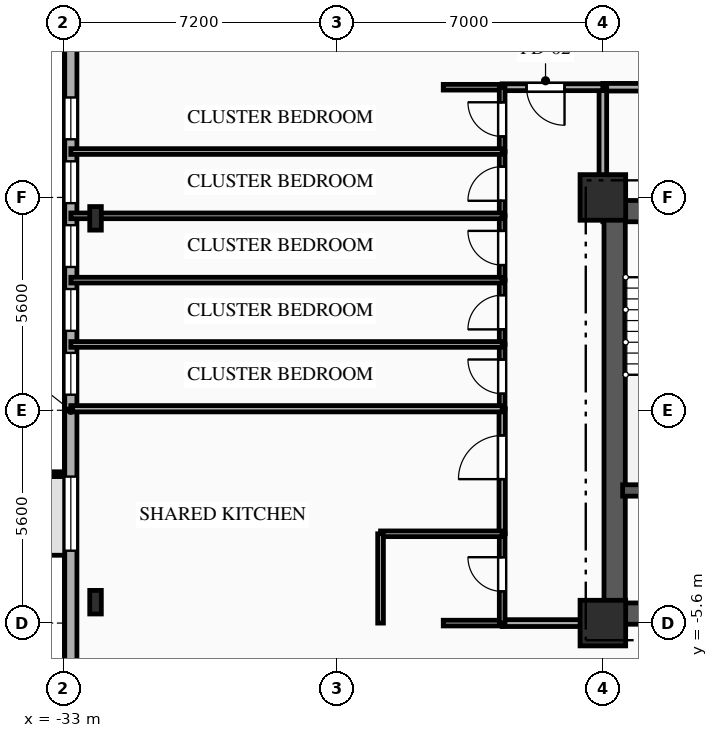
"""IFC4 building model, lengths in metres.
Left out: names, types, materials, properties, quantities, classifications, styles, units other than length and angle.
Written with IfcOpenShell. Run it as: python <this file> out.ifc"""

import sys

from ifc_helpers import new_model, si_unit, direction, frame, frame_2d, origin, origin_2d, place, context, subcontext, project, spatial, rectangle, i_section, extrude, element, fill, save


model = new_model("IFC4")
c1 = context("Model", 3, precision=1e-05, world=origin(), true_north=direction((0.0, 1.0)))
c2 = subcontext(c1, "Body", "Model", "MODEL_VIEW")
j1 = project(units=[si_unit("LENGTHUNIT", "METRE"), si_unit("PLANEANGLEUNIT", "RADIAN")], contexts=[c1])
p1 = place(None, origin())
s1 = spatial("IfcSite", under=j1, at=p1, CompositionType="ELEMENT")
p2 = place(p1, origin())
s2 = spatial("IfcBuilding", under=s1, at=p2, CompositionType="ELEMENT")
p3 = place(p2, frame((0.0, 0.0, 60.5)))
s3 = spatial("IfcBuildingStorey", under=s2, at=p3, CompositionType="ELEMENT", Elevation=60.5)
for number, where, z_axis, x_axis in (
    (1, (-18.8, -5.6, 0.0), (0.0, 0.0, 1.0), (1.0, 0.0, 0.0)),
    (2, (-18.8, 5.6, 0.0), (0.0, 0.0, 1.0), (1.0, 0.0, 0.0)),
):
    element("IfcColumn", number, at=place(p3, frame(where, z_axis=z_axis, x_axis=x_axis)), inside=s3, PredefinedType="COLUMN", context=c2, shape_type="SweptSolid", body=[
        extrude(rectangle(XDim=1.2, YDim=1.2, at=origin_2d()), origin(), (0.0, 0.0, 1.0), 3.35),
    ])
for number, where, z_axis, x_axis in (
    (3, (-32.15, 5.05, 0.0), (0.0, 0.0, 1.0), (1.0, 0.0, 0.0)),
    (4, (-32.15, -5.05, 0.0), (0.0, 0.0, 1.0), (1.0, 0.0, 0.0)),
):
    element("IfcColumn", number, at=place(p3, frame(where, z_axis=z_axis, x_axis=x_axis)), inside=s3, PredefinedType="COLUMN", context=c2, shape_type="SweptSolid", body=[
        extrude(i_section(OverallWidth=0.305, OverallDepth=0.62, WebThickness=0.021, FlangeThickness=0.04, FilletRadius=0.027, at=origin_2d()), origin(), (0.0, 0.0, 1.0), 3.35),
    ])
p4 = place(p3, frame((-32.8, -15.8, 0.0), z_axis=(0.0, 0.0, 1.0), x_axis=(0.0, 1.0, 0.0)))
e5 = element("IfcWall", 5, at=p4, inside=s3, PredefinedType="SOLIDWALL", context=c2, shape_type="SweptSolid", body=[
    extrude(rectangle(XDim=31.6, YDim=0.32, at=frame_2d((15.8, 0.0))), origin(), (0.0, 0.0, 1.0), 3.035),
])
p5 = place(p4, frame((12.105, 0.0, 0.85)))
e6 = element("IfcOpeningElement", 6, at=p5, cuts=e5, PredefinedType="OPENING", context=c2, shape_type="SweptSolid", body=[
    extrude(rectangle(XDim=1.95, YDim=1.85, at=frame_2d((0.975, 0.925))), frame((0.0, 0.17, 0.0), z_axis=(0.0, -1.0, 0.0), x_axis=(1.0, 0.0, 0.0)), (0.0, 0.0, 1.0), 0.34),
])
p6 = place(p4, frame((16.21, 0.0, 0.85)))
e7 = element("IfcOpeningElement", 7, at=p6, cuts=e5, PredefinedType="OPENING", context=c2, shape_type="SweptSolid", body=[
    extrude(rectangle(XDim=1.1, YDim=1.85, at=frame_2d((0.55, 0.925))), frame((0.0, 0.17, 0.0), z_axis=(0.0, -1.0, 0.0), x_axis=(1.0, 0.0, 0.0)), (0.0, 0.0, 1.0), 0.34),
])
p7 = place(p4, frame((17.89, 0.0, 0.85)))
e8 = element("IfcOpeningElement", 8, at=p7, cuts=e5, PredefinedType="OPENING", context=c2, shape_type="SweptSolid", body=[
    extrude(rectangle(XDim=1.1, YDim=1.85, at=frame_2d((0.55, 0.925))), frame((0.0, 0.17, 0.0), z_axis=(0.0, -1.0, 0.0), x_axis=(1.0, 0.0, 0.0)), (0.0, 0.0, 1.0), 0.34),
])
p8 = place(p4, frame((19.57, 0.0, 0.85)))
e9 = element("IfcOpeningElement", 9, at=p8, cuts=e5, PredefinedType="OPENING", context=c2, shape_type="SweptSolid", body=[
    extrude(rectangle(XDim=1.1, YDim=1.85, at=frame_2d((0.55, 0.925))), frame((0.0, 0.17, 0.0), z_axis=(0.0, -1.0, 0.0), x_axis=(1.0, 0.0, 0.0)), (0.0, 0.0, 1.0), 0.34),
])
p9 = place(p4, frame((21.25, 0.0, 0.85)))
e10 = element("IfcOpeningElement", 10, at=p9, cuts=e5, PredefinedType="OPENING", context=c2, shape_type="SweptSolid", body=[
    extrude(rectangle(XDim=1.1, YDim=1.85, at=frame_2d((0.55, 0.925))), frame((0.0, 0.17, 0.0), z_axis=(0.0, -1.0, 0.0), x_axis=(1.0, 0.0, 0.0)), (0.0, 0.0, 1.0), 0.34),
])
p10 = place(p4, frame((22.93, 0.0, 0.85)))
e11 = element("IfcOpeningElement", 11, at=p10, cuts=e5, PredefinedType="OPENING", context=c2, shape_type="SweptSolid", body=[
    extrude(rectangle(XDim=1.1, YDim=1.85, at=frame_2d((0.55, 0.925))), frame((0.0, 0.17, 0.0), z_axis=(0.0, -1.0, 0.0), x_axis=(1.0, 0.0, 0.0)), (0.0, 0.0, 1.0), 0.34),
])
p11 = place(p3, frame((-18.8, 5.24, 0.0), z_axis=(0.0, 0.0, 1.0), x_axis=(1.0, 0.0, 0.0)))
e12 = element("IfcWall", 12, at=p11, inside=s3, PredefinedType="SHEAR", context=c2, shape_type="SweptSolid", body=[
    extrude(rectangle(XDim=9.6, YDim=0.56, at=frame_2d((4.8, 0.0))), origin(), (0.0, 0.0, 1.0), 3.035),
])
p12 = place(p11, frame((1.55, 0.0, 0.0)))
e13 = element("IfcOpeningElement", 13, at=p12, cuts=e12, PredefinedType="OPENING", context=c2, shape_type="SweptSolid", body=[
    extrude(rectangle(XDim=1.1, YDim=2.15, at=frame_2d((0.55, 1.075))), frame((0.0, 0.29, 0.0), z_axis=(0.0, -1.0, 0.0), x_axis=(1.0, 0.0, 0.0)), (0.0, 0.0, 1.0), 0.58),
])
p13 = place(p11, frame((4.775, 0.0, 0.0)))
e14 = element("IfcOpeningElement", 14, at=p13, cuts=e12, PredefinedType="OPENING", context=c2, shape_type="SweptSolid", body=[
    extrude(rectangle(XDim=1.05, YDim=2.1, at=frame_2d((0.525, 1.05))), frame((0.0, 0.29, 0.0), z_axis=(0.0, -1.0, 0.0), x_axis=(1.0, 0.0, 0.0)), (0.0, 0.0, 1.0), 0.58),
])
p14 = place(p3, frame((-18.8, -5.35, 0.0), z_axis=(0.0, 0.0, 1.0), x_axis=(1.0, 0.0, 0.0)))
e15 = element("IfcWall", 15, at=p14, inside=s3, PredefinedType="SHEAR", context=c2, shape_type="SweptSolid", body=[
    extrude(rectangle(XDim=9.6, YDim=0.56, at=frame_2d((4.8, 0.0))), origin(), (0.0, 0.0, 1.0), 3.035),
])
p15 = place(p14, frame((1.05, 0.0, 0.0)))
e16 = element("IfcOpeningElement", 16, at=p15, cuts=e15, PredefinedType="OPENING", context=c2, shape_type="SweptSolid", body=[
    extrude(rectangle(XDim=0.9, YDim=2.1, at=frame_2d((0.45, 1.05))), frame((0.0, 0.29, 0.0), z_axis=(0.0, -1.0, 0.0), x_axis=(1.0, 0.0, 0.0)), (0.0, 0.0, 1.0), 0.58),
])
p16 = place(p3, frame((-18.49, -5.05, 0.0), z_axis=(0.0, 0.0, 1.0), x_axis=(0.0, 1.0, 0.0)))
e17 = element("IfcWall", 17, at=p16, inside=s3, PredefinedType="SHEAR", context=c2, shape_type="SweptSolid", body=[
    extrude(rectangle(XDim=10.1, YDim=0.56, at=frame_2d((5.05, 0.0))), origin(), (0.0, 0.0, 1.0), 3.035),
])
p17 = place(p3, frame((-18.28, -2.11, 0.0), z_axis=(0.0, 0.0, 1.0), x_axis=(1.0, 0.0, 0.0)))
e18 = element("IfcWall", 18, at=p17, inside=s3, PredefinedType="SHEAR", context=c2, shape_type="SweptSolid", body=[
    extrude(rectangle(XDim=3.18, YDim=0.3, at=frame_2d((1.59, 0.0))), origin(), (0.0, 0.0, 1.0), 3.035),
])
p18 = place(p3, frame((-12.0, 8.5, 0.0), z_axis=(0.0, 0.0, 1.0), x_axis=(-1.0, 0.0, 0.0)))
e19 = element("IfcWall", 19, at=p18, inside=s3, PredefinedType="PARTITIONING", context=c2, shape_type="SweptSolid", body=[
    extrude(rectangle(XDim=6.8, YDim=0.2, at=frame_2d((3.4, 0.0))), origin(), (0.0, 0.0, 1.0), 3.035),
])
p19 = place(p18, frame((1.715, 0.0, 0.0)))
e20 = element("IfcOpeningElement", 20, at=p19, cuts=e19, PredefinedType="OPENING", context=c2, shape_type="SweptSolid", body=[
    extrude(rectangle(XDim=1.1, YDim=2.15, at=frame_2d((0.55, 1.075))), frame((0.0, 0.11, 0.0), z_axis=(0.0, -1.0, 0.0), x_axis=(1.0, 0.0, 0.0)), (0.0, 0.0, 1.0), 0.22),
])
p20 = place(p3, frame((-18.8, 8.5, 0.0), z_axis=(0.0, 0.0, 1.0), x_axis=(0.0, -1.0, 0.0)))
e21 = element("IfcWall", 21, at=p20, inside=s3, PredefinedType="PARTITIONING", context=c2, shape_type="SweptSolid", body=[
    extrude(rectangle(XDim=2.9, YDim=0.2, at=frame_2d((1.45, 0.0))), origin(), (0.0, 0.0, 1.0), 2.52),
])
p21 = place(p3, frame((-18.8, 8.5, 0.0), z_axis=(0.0, 0.0, 1.0), x_axis=(-1.0, 0.0, 0.0)))
e22 = element("IfcWall", 22, at=p21, inside=s3, PredefinedType="PARTITIONING", context=c2, shape_type="SweptSolid", body=[
    extrude(rectangle(XDim=2.65, YDim=0.18, at=frame_2d((1.325, 0.0))), origin(), (0.0, 0.0, 1.0), 3.035),
])
p22 = place(p21, frame((1.009, 0.0, 0.0)))
e23 = element("IfcOpeningElement", 23, at=p22, cuts=e22, PredefinedType="OPENING", context=c2, shape_type="SweptSolid", body=[
    extrude(rectangle(XDim=1.0, YDim=2.15, at=frame_2d((0.5, 1.075))), frame((0.0, 0.1, 0.0), z_axis=(0.0, -1.0, 0.0), x_axis=(1.0, 0.0, 0.0)), (0.0, 0.0, 1.0), 0.2),
])
p23 = place(p3, frame((-21.45, 8.5, 0.0), z_axis=(0.0, 0.0, 1.0), x_axis=(-1.0, 0.0, 0.0)))
e24 = element("IfcWall", 24, at=p23, inside=s3, PredefinedType="PARTITIONING", context=c2, shape_type="SweptSolid", body=[
    extrude(rectangle(XDim=1.55, YDim=0.15, at=frame_2d((0.775, 0.0))), origin(), (0.0, 0.0, 1.0), 3.035),
])
p24 = place(p3, frame((-21.45, -5.6, 0.0), z_axis=(0.0, 0.0, 1.0), x_axis=(1.0, 0.0, 0.0)))
e25 = element("IfcWall", 25, at=p24, inside=s3, PredefinedType="PARTITIONING", context=c2, shape_type="SweptSolid", body=[
    extrude(rectangle(XDim=2.65, YDim=0.18, at=frame_2d((1.325, 0.0))), origin(), (0.0, 0.0, 1.0), 3.035),
])
p25 = place(p3, frame((-23.0, -5.6, 0.0), z_axis=(0.0, 0.0, 1.0), x_axis=(1.0, 0.0, 0.0)))
e26 = element("IfcWall", 26, at=p25, inside=s3, PredefinedType="PLUMBINGWALL", context=c2, shape_type="SweptSolid", body=[
    extrude(rectangle(XDim=1.55, YDim=0.15, at=frame_2d((0.775, 0.0))), origin(), (0.0, 0.0, 1.0), 3.035),
])
p26 = place(p3, frame((-21.45, -5.6, 0.0), z_axis=(0.0, 0.0, 1.0), x_axis=(0.0, 1.0, 0.0)))
e27 = element("IfcWall", 27, at=p26, inside=s3, PredefinedType="PLUMBINGWALL", context=c2, shape_type="SweptSolid", body=[
    extrude(rectangle(XDim=2.35, YDim=0.15, at=frame_2d((1.175, 0.0))), origin(), (0.0, 0.0, 1.0), 3.035),
])
p27 = place(p26, frame((0.834, 0.0, 0.0)))
e28 = element("IfcOpeningElement", 28, at=p27, cuts=e27, PredefinedType="OPENING", context=c2, shape_type="SweptSolid", body=[
    extrude(rectangle(XDim=0.9, YDim=2.1, at=frame_2d((0.45, 1.05))), frame((0.0, 0.085, 0.0), z_axis=(0.0, -1.0, 0.0), x_axis=(1.0, 0.0, 0.0)), (0.0, 0.0, 1.0), 0.17),
])
p28 = place(p3, frame((-21.45, -3.25, 0.0), z_axis=(0.0, 0.0, 1.0), x_axis=(0.0, 1.0, 0.0)))
e29 = element("IfcWall", 29, at=p28, inside=s3, PredefinedType="PARTITIONING", context=c2, shape_type="SweptSolid", body=[
    extrude(rectangle(XDim=3.29, YDim=0.165, at=frame_2d((1.645, 0.0))), origin(), (0.0, 0.0, 1.0), 3.035),
])
p29 = place(p28, frame((1.438, 0.0, 0.0)))
e30 = element("IfcOpeningElement", 30, at=p29, cuts=e29, PredefinedType="OPENING", context=c2, shape_type="SweptSolid", body=[
    extrude(rectangle(XDim=1.15, YDim=2.15, at=frame_2d((0.575, 1.075))), frame((0.0, 0.093, 0.0), z_axis=(0.0, -1.0, 0.0), x_axis=(1.0, 0.0, 0.0)), (0.0, 0.0, 1.0), 0.185),
])
p30 = place(p3, frame((-21.45, 0.04, 0.0), z_axis=(0.0, 0.0, 1.0), x_axis=(0.0, 1.0, 0.0)))
e31 = element("IfcWall", 31, at=p30, inside=s3, PredefinedType="PARTITIONING", context=c2, shape_type="SweptSolid", body=[
    extrude(rectangle(XDim=1.692, YDim=0.15, at=frame_2d((0.846, 0.0))), origin(), (0.0, 0.0, 1.0), 3.035),
])
p31 = place(p30, frame((0.396, 0.0, 0.0)))
e32 = element("IfcOpeningElement", 32, at=p31, cuts=e31, PredefinedType="OPENING", context=c2, shape_type="SweptSolid", body=[
    extrude(rectangle(XDim=0.9, YDim=2.1, at=frame_2d((0.45, 1.05))), frame((0.0, 0.085, 0.0), z_axis=(0.0, -1.0, 0.0), x_axis=(1.0, 0.0, 0.0)), (0.0, 0.0, 1.0), 0.17),
])
p32 = place(p3, frame((-21.45, 1.732, 0.0), z_axis=(0.0, 0.0, 1.0), x_axis=(0.0, 1.0, 0.0)))
e33 = element("IfcWall", 33, at=p32, inside=s3, PredefinedType="PARTITIONING", context=c2, shape_type="SweptSolid", body=[
    extrude(rectangle(XDim=1.692, YDim=0.15, at=frame_2d((0.846, 0.0))), origin(), (0.0, 0.0, 1.0), 3.035),
])
p33 = place(p32, frame((0.396, 0.0, 0.0)))
e34 = element("IfcOpeningElement", 34, at=p33, cuts=e33, PredefinedType="OPENING", context=c2, shape_type="SweptSolid", body=[
    extrude(rectangle(XDim=0.9, YDim=2.1, at=frame_2d((0.45, 1.05))), frame((0.0, 0.085, 0.0), z_axis=(0.0, -1.0, 0.0), x_axis=(1.0, 0.0, 0.0)), (0.0, 0.0, 1.0), 0.17),
])
p34 = place(p3, frame((-21.45, 3.424, 0.0), z_axis=(0.0, 0.0, 1.0), x_axis=(0.0, 1.0, 0.0)))
e35 = element("IfcWall", 35, at=p34, inside=s3, PredefinedType="PARTITIONING", context=c2, shape_type="SweptSolid", body=[
    extrude(rectangle(XDim=1.692, YDim=0.15, at=frame_2d((0.846, 0.0))), origin(), (0.0, 0.0, 1.0), 3.035),
])
p35 = place(p34, frame((0.396, 0.0, 0.0)))
e36 = element("IfcOpeningElement", 36, at=p35, cuts=e35, PredefinedType="OPENING", context=c2, shape_type="SweptSolid", body=[
    extrude(rectangle(XDim=0.9, YDim=2.1, at=frame_2d((0.45, 1.05))), frame((0.0, 0.085, 0.0), z_axis=(0.0, -1.0, 0.0), x_axis=(1.0, 0.0, 0.0)), (0.0, 0.0, 1.0), 0.17),
])
p36 = place(p3, frame((-21.45, 5.116, 0.0), z_axis=(0.0, 0.0, 1.0), x_axis=(0.0, 1.0, 0.0)))
e37 = element("IfcWall", 37, at=p36, inside=s3, PredefinedType="PARTITIONING", context=c2, shape_type="SweptSolid", body=[
    extrude(rectangle(XDim=1.692, YDim=0.15, at=frame_2d((0.846, 0.0))), origin(), (0.0, 0.0, 1.0), 3.035),
])
p37 = place(p36, frame((0.396, 0.0, 0.0)))
e38 = element("IfcOpeningElement", 38, at=p37, cuts=e37, PredefinedType="OPENING", context=c2, shape_type="SweptSolid", body=[
    extrude(rectangle(XDim=0.9, YDim=2.1, at=frame_2d((0.45, 1.05))), frame((0.0, 0.085, 0.0), z_axis=(0.0, -1.0, 0.0), x_axis=(1.0, 0.0, 0.0)), (0.0, 0.0, 1.0), 0.17),
])
p38 = place(p3, frame((-21.45, 6.808, 0.0), z_axis=(0.0, 0.0, 1.0), x_axis=(0.0, 1.0, 0.0)))
e39 = element("IfcWall", 39, at=p38, inside=s3, PredefinedType="PARTITIONING", context=c2, shape_type="SweptSolid", body=[
    extrude(rectangle(XDim=1.692, YDim=0.15, at=frame_2d((0.846, 0.0))), origin(), (0.0, 0.0, 1.0), 3.035),
])
p39 = place(p38, frame((0.396, 0.0, 0.0)))
e40 = element("IfcOpeningElement", 40, at=p39, cuts=e39, PredefinedType="OPENING", context=c2, shape_type="SweptSolid", body=[
    extrude(rectangle(XDim=0.9, YDim=2.1, at=frame_2d((0.45, 1.05))), frame((0.0, 0.085, 0.0), z_axis=(0.0, -1.0, 0.0), x_axis=(1.0, 0.0, 0.0)), (0.0, 0.0, 1.0), 0.17),
])
p40 = place(p3, frame((-24.65, -3.25, 0.0), z_axis=(0.0, 0.0, 1.0), x_axis=(1.0, 0.0, 0.0)))
e41 = element("IfcWall", 41, at=p40, inside=s3, PredefinedType="PLUMBINGWALL", context=c2, shape_type="SweptSolid", body=[
    extrude(rectangle(XDim=3.2, YDim=0.15, at=frame_2d((1.6, 0.0))), origin(), (0.0, 0.0, 1.0), 2.52),
])
p41 = place(p3, frame((-24.65, -5.6, 0.0), z_axis=(0.0, 0.0, 1.0), x_axis=(0.0, 1.0, 0.0)))
e42 = element("IfcWall", 42, at=p41, inside=s3, PredefinedType="PLUMBINGWALL", context=c2, shape_type="SweptSolid", body=[
    extrude(rectangle(XDim=2.35, YDim=0.15, at=frame_2d((1.175, 0.0))), origin(), (0.0, 0.0, 1.0), 3.035),
])
p42 = place(p3, frame((-32.8, 0.04, 0.0), z_axis=(0.0, 0.0, 1.0), x_axis=(1.0, 0.0, 0.0)))
e43 = element("IfcWall", 43, at=p42, inside=s3, PredefinedType="PARTITIONING", context=c2, shape_type="SweptSolid", body=[
    extrude(rectangle(XDim=11.35, YDim=0.165, at=frame_2d((5.675, 0.0))), origin(), (0.0, 0.0, 1.0), 3.035),
])
p43 = place(p3, frame((-32.8, 1.732, 0.0), z_axis=(0.0, 0.0, 1.0), x_axis=(1.0, 0.0, 0.0)))
e44 = element("IfcWall", 44, at=p43, inside=s3, PredefinedType="PARTITIONING", context=c2, shape_type="SweptSolid", body=[
    extrude(rectangle(XDim=11.35, YDim=0.15, at=frame_2d((5.675, 0.0))), origin(), (0.0, 0.0, 1.0), 3.035),
])
for number, where, z_axis, x_axis in (
    (45, (-32.8, 3.424, 0.0), (0.0, 0.0, 1.0), (1.0, 0.0, 0.0)),
    (46, (-32.8, 5.116, 0.0), (0.0, 0.0, 1.0), (1.0, 0.0, 0.0)),
):
    element("IfcWall", number, at=place(p3, frame(where, z_axis=z_axis, x_axis=x_axis)), inside=s3, PredefinedType="PARTITIONING", context=c2, shape_type="SweptSolid", body=[
        extrude(rectangle(XDim=11.35, YDim=0.15, at=frame_2d((5.675, 0.0))), origin(), (0.0, 0.0, 1.0), 2.52),
    ])
p44 = place(p3, frame((-32.8, 6.808, 0.0), z_axis=(0.0, 0.0, 1.0), x_axis=(1.0, 0.0, 0.0)))
e47 = element("IfcWall", 47, at=p44, inside=s3, PredefinedType="PARTITIONING", context=c2, shape_type="SweptSolid", body=[
    extrude(rectangle(XDim=11.35, YDim=0.15, at=frame_2d((5.675, 0.0))), origin(), (0.0, 0.0, 1.0), 3.035),
])
p45 = place(p5, origin())
e48 = element("IfcWindow", 48, at=p45, inside=s3, PartitioningType="SINGLE_PANEL", PredefinedType="WINDOW", context=c2, shape_type="SweptSolid", body=[
    extrude(rectangle(XDim=1.95, YDim=1.85, at=frame_2d((0.975, 0.925))), frame((0.0, 0.03, 0.0), z_axis=(0.0, -1.0, 0.0), x_axis=(1.0, 0.0, 0.0)), (0.0, 0.0, 1.0), 0.06),
])
fill(e6, e48)
p46 = place(p6, origin())
e49 = element("IfcWindow", 49, at=p46, inside=s3, PartitioningType="SINGLE_PANEL", PredefinedType="WINDOW", context=c2, shape_type="SweptSolid", body=[
    extrude(rectangle(XDim=1.1, YDim=1.85, at=frame_2d((0.55, 0.925))), frame((0.0, 0.03, 0.0), z_axis=(0.0, -1.0, 0.0), x_axis=(1.0, 0.0, 0.0)), (0.0, 0.0, 1.0), 0.06),
])
fill(e7, e49)
p47 = place(p7, origin())
e50 = element("IfcWindow", 50, at=p47, inside=s3, PartitioningType="SINGLE_PANEL", PredefinedType="WINDOW", context=c2, shape_type="SweptSolid", body=[
    extrude(rectangle(XDim=1.1, YDim=1.85, at=frame_2d((0.55, 0.925))), frame((0.0, 0.03, 0.0), z_axis=(0.0, -1.0, 0.0), x_axis=(1.0, 0.0, 0.0)), (0.0, 0.0, 1.0), 0.06),
])
fill(e8, e50)
p48 = place(p8, origin())
e51 = element("IfcWindow", 51, at=p48, inside=s3, PartitioningType="SINGLE_PANEL", PredefinedType="WINDOW", context=c2, shape_type="SweptSolid", body=[
    extrude(rectangle(XDim=1.1, YDim=1.85, at=frame_2d((0.55, 0.925))), frame((0.0, 0.03, 0.0), z_axis=(0.0, -1.0, 0.0), x_axis=(1.0, 0.0, 0.0)), (0.0, 0.0, 1.0), 0.06),
])
fill(e9, e51)
p49 = place(p9, origin())
e52 = element("IfcWindow", 52, at=p49, inside=s3, PartitioningType="SINGLE_PANEL", PredefinedType="WINDOW", context=c2, shape_type="SweptSolid", body=[
    extrude(rectangle(XDim=1.1, YDim=1.85, at=frame_2d((0.55, 0.925))), frame((0.0, 0.03, 0.0), z_axis=(0.0, -1.0, 0.0), x_axis=(1.0, 0.0, 0.0)), (0.0, 0.0, 1.0), 0.06),
])
fill(e10, e52)
p50 = place(p10, origin())
e53 = element("IfcWindow", 53, at=p50, inside=s3, PartitioningType="SINGLE_PANEL", PredefinedType="WINDOW", context=c2, shape_type="SweptSolid", body=[
    extrude(rectangle(XDim=1.1, YDim=1.85, at=frame_2d((0.55, 0.925))), frame((0.0, 0.03, 0.0), z_axis=(0.0, -1.0, 0.0), x_axis=(1.0, 0.0, 0.0)), (0.0, 0.0, 1.0), 0.06),
])
fill(e11, e53)
p51 = place(p22, origin())
e54 = element("IfcDoor", 54, at=p51, inside=s3, OperationType="SINGLE_SWING_LEFT", PredefinedType="DOOR", context=c2, shape_type="SweptSolid", body=[
    extrude(rectangle(XDim=1.0, YDim=2.15, at=frame_2d((0.5, 1.075))), frame((0.0, 0.025, 0.0), z_axis=(0.0, -1.0, 0.0), x_axis=(1.0, 0.0, 0.0)), (0.0, 0.0, 1.0), 0.05),
])
fill(e23, e54)
p52 = place(p27, origin())
e55 = element("IfcDoor", 55, at=p52, inside=s3, OperationType="SINGLE_SWING_RIGHT", PredefinedType="DOOR", context=c2, shape_type="SweptSolid", body=[
    extrude(rectangle(XDim=0.9, YDim=2.1, at=frame_2d((0.45, 1.05))), frame((0.0, 0.025, 0.0), z_axis=(0.0, -1.0, 0.0), x_axis=(1.0, 0.0, 0.0)), (0.0, 0.0, 1.0), 0.05),
])
fill(e28, e55)
p53 = place(p29, origin())
e56 = element("IfcDoor", 56, at=p53, inside=s3, OperationType="SINGLE_SWING_LEFT", PredefinedType="DOOR", context=c2, shape_type="SweptSolid", body=[
    extrude(rectangle(XDim=1.15, YDim=2.15, at=frame_2d((0.575, 1.075))), frame((0.0, 0.025, 0.0), z_axis=(0.0, -1.0, 0.0), x_axis=(1.0, 0.0, 0.0)), (0.0, 0.0, 1.0), 0.05),
])
fill(e30, e56)
p54 = place(p31, origin())
e57 = element("IfcDoor", 57, at=p54, inside=s3, OperationType="SINGLE_SWING_RIGHT", PredefinedType="DOOR", context=c2, shape_type="SweptSolid", body=[
    extrude(rectangle(XDim=0.9, YDim=2.1, at=frame_2d((0.45, 1.05))), frame((0.0, 0.025, 0.0), z_axis=(0.0, -1.0, 0.0), x_axis=(1.0, 0.0, 0.0)), (0.0, 0.0, 1.0), 0.05),
])
fill(e32, e57)
p55 = place(p33, origin())
e58 = element("IfcDoor", 58, at=p55, inside=s3, OperationType="SINGLE_SWING_LEFT", PredefinedType="DOOR", context=c2, shape_type="SweptSolid", body=[
    extrude(rectangle(XDim=0.9, YDim=2.1, at=frame_2d((0.45, 1.05))), frame((0.0, 0.025, 0.0), z_axis=(0.0, -1.0, 0.0), x_axis=(1.0, 0.0, 0.0)), (0.0, 0.0, 1.0), 0.05),
])
fill(e34, e58)
p56 = place(p35, origin())
e59 = element("IfcDoor", 59, at=p56, inside=s3, OperationType="SINGLE_SWING_RIGHT", PredefinedType="DOOR", context=c2, shape_type="SweptSolid", body=[
    extrude(rectangle(XDim=0.9, YDim=2.1, at=frame_2d((0.45, 1.05))), frame((0.0, 0.025, 0.0), z_axis=(0.0, -1.0, 0.0), x_axis=(1.0, 0.0, 0.0)), (0.0, 0.0, 1.0), 0.05),
])
fill(e36, e59)
p57 = place(p37, origin())
e60 = element("IfcDoor", 60, at=p57, inside=s3, OperationType="SINGLE_SWING_LEFT", PredefinedType="DOOR", context=c2, shape_type="SweptSolid", body=[
    extrude(rectangle(XDim=0.9, YDim=2.1, at=frame_2d((0.45, 1.05))), frame((0.0, 0.025, 0.0), z_axis=(0.0, -1.0, 0.0), x_axis=(1.0, 0.0, 0.0)), (0.0, 0.0, 1.0), 0.05),
])
fill(e38, e60)
p58 = place(p39, origin())
e61 = element("IfcDoor", 61, at=p58, inside=s3, OperationType="SINGLE_SWING_RIGHT", PredefinedType="DOOR", context=c2, shape_type="SweptSolid", body=[
    extrude(rectangle(XDim=0.9, YDim=2.1, at=frame_2d((0.45, 1.05))), frame((0.0, 0.025, 0.0), z_axis=(0.0, -1.0, 0.0), x_axis=(1.0, 0.0, 0.0)), (0.0, 0.0, 1.0), 0.05),
])
fill(e40, e61)
save(model, sys.argv[1])
